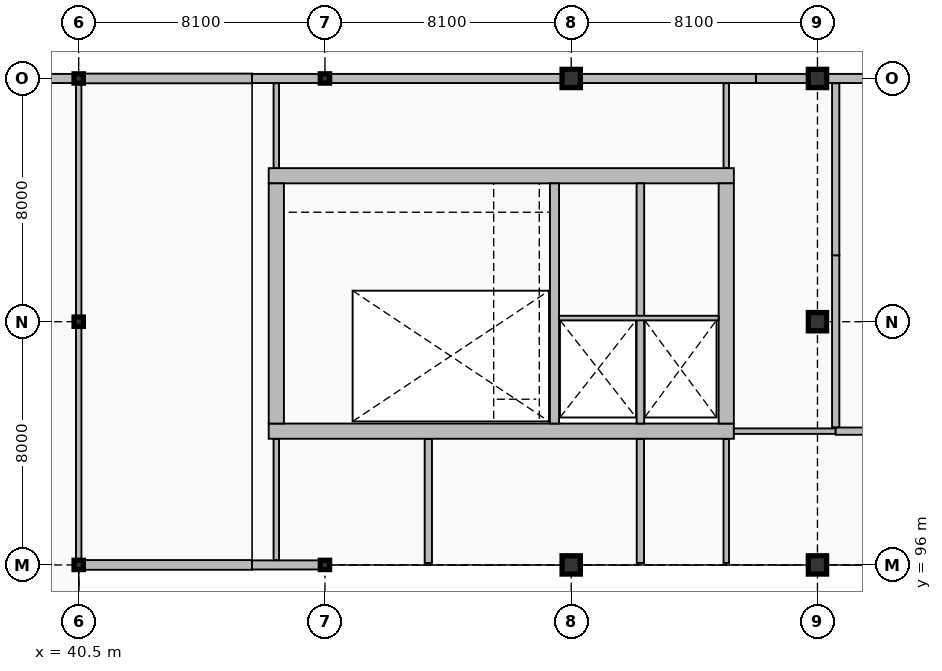
"""IFC4 building model, lengths in metres.
Left out: names, types, materials, properties, quantities, classifications, styles, units other than length and angle.
Written with IfcOpenShell. Run it as: python <this file> out.ifc"""

import sys

from ifc_helpers import new_model, si_unit, direction, frame, frame_2d, origin, origin_2d, place, context, subcontext, project, spatial, rectangle, hollow_rectangle, extrude, element, fill, save


model = new_model("IFC4")
c1 = context("Model", 3, precision=1e-05, world=origin(), true_north=direction((0.0, 1.0)))
c2 = subcontext(c1, "Body", "Model", "MODEL_VIEW")
j1 = project(units=[si_unit("LENGTHUNIT", "METRE"), si_unit("PLANEANGLEUNIT", "RADIAN")], contexts=[c1])
p1 = place(None, origin())
s1 = spatial("IfcSite", under=j1, at=p1, CompositionType="ELEMENT")
p2 = place(p1, origin())
s2 = spatial("IfcBuilding", under=s1, at=p2, CompositionType="ELEMENT")
p3 = place(p2, frame((0.0, 0.0, 19.8)))
s3 = spatial("IfcBuildingStorey", under=s2, at=p3, CompositionType="ELEMENT", Elevation=19.8)
p4 = place(p3, frame((46.75, 100.4, 0.0), z_axis=(0.0, 0.0, 1.0), x_axis=(1.0, 0.0, 0.0)))
e1 = element("IfcWall", 1, at=p4, inside=s3, PredefinedType="SHEAR", context=c2, shape_type="SweptSolid", body=[
    extrude(rectangle(XDim=15.3, YDim=0.5, at=frame_2d((7.65, 0.0))), origin(), (0.0, 0.0, 1.0), 5.1),
])
p5 = place(p4, frame((1.0, 0.0, 0.0)))
e2 = element("IfcOpeningElement", 2, at=p5, cuts=e1, PredefinedType="OPENING", context=c2, shape_type="SweptSolid", body=[
    extrude(rectangle(XDim=1.15, YDim=2.25, at=frame_2d((0.575, 1.125))), frame((0.0, 0.26, 0.0), z_axis=(0.0, -1.0, 0.0), x_axis=(1.0, 0.0, 0.0)), (0.0, 0.0, 1.0), 0.52),
])
p6 = place(p4, frame((10.282, 0.0, 0.0)))
e3 = element("IfcOpeningElement", 3, at=p6, cuts=e1, PredefinedType="OPENING", context=c2, shape_type="SweptSolid", body=[
    extrude(rectangle(XDim=1.1, YDim=2.2, at=frame_2d((0.55, 1.1))), frame((0.0, 0.26, 0.0), z_axis=(0.0, -1.0, 0.0), x_axis=(1.0, 0.0, 0.0)), (0.0, 0.0, 1.0), 0.52),
])
p7 = place(p4, frame((12.998, 0.0, 0.0)))
e4 = element("IfcOpeningElement", 4, at=p7, cuts=e1, PredefinedType="OPENING", context=c2, shape_type="SweptSolid", body=[
    extrude(rectangle(XDim=1.1, YDim=2.2, at=frame_2d((0.55, 1.1))), frame((0.0, 0.26, 0.0), z_axis=(0.0, -1.0, 0.0), x_axis=(1.0, 0.0, 0.0)), (0.0, 0.0, 1.0), 0.52),
])
p8 = place(p3, frame((46.75, 108.8, 0.0), z_axis=(0.0, 0.0, 1.0), x_axis=(1.0, 0.0, 0.0)))
e5 = element("IfcWall", 5, at=p8, inside=s3, PredefinedType="SHEAR", context=c2, shape_type="SweptSolid", body=[
    extrude(rectangle(XDim=15.3, YDim=0.5, at=frame_2d((7.65, 0.0))), origin(), (0.0, 0.0, 1.0), 5.1),
])
for number, where, z_axis, x_axis in (
    (6, (47.0, 100.65, 0.0), (0.0, 0.0, 1.0), (0.0, 1.0, 0.0)),
    (7, (61.8, 100.65, 0.0), (0.0, 0.0, 1.0), (0.0, 1.0, 0.0)),
):
    element("IfcWall", number, at=place(p3, frame(where, z_axis=z_axis, x_axis=x_axis)), inside=s3, PredefinedType="SHEAR", context=c2, shape_type="SweptSolid", body=[
        extrude(rectangle(XDim=7.9, YDim=0.5, at=frame_2d((3.95, 0.0))), origin(), (0.0, 0.0, 1.0), 5.1),
    ])
p9 = place(p3, frame((56.15, 100.65, 0.0), z_axis=(0.0, 0.0, 1.0), x_axis=(0.0, 1.0, 0.0)))
e8 = element("IfcWall", 8, at=p9, inside=s3, PredefinedType="SHEAR", context=c2, shape_type="SweptSolid", body=[
    extrude(rectangle(XDim=7.9, YDim=0.3, at=frame_2d((3.95, 0.0))), origin(), (0.0, 0.0, 1.0), 5.1),
])
p10 = place(p3, frame((58.975, 100.65, 0.0), z_axis=(0.0, 0.0, 1.0), x_axis=(0.0, 1.0, 0.0)))
e9 = element("IfcWall", 9, at=p10, inside=s3, PredefinedType="SHEAR", context=c2, shape_type="SweptSolid", body=[
    extrude(rectangle(XDim=7.9, YDim=0.25, at=frame_2d((3.95, 0.0))), origin(), (0.0, 0.0, 1.0), 5.1),
])
for number, where, z_axis, x_axis in (
    (10, (40.5, 96.0, 0.0), (0.0, 0.0, 1.0), (1.0, 0.0, 0.0)),
    (11, (40.5, 104.0, 0.0), (0.0, 0.0, 1.0), (1.0, 0.0, 0.0)),
    (12, (40.5, 112.0, 0.0), (0.0, 0.0, 1.0), (1.0, 0.0, 0.0)),
    (13, (48.6, 96.0, 0.0), (0.0, 0.0, 1.0), (1.0, 0.0, 0.0)),
    (14, (48.6, 112.0, 0.0), (0.0, 0.0, 1.0), (1.0, 0.0, 0.0)),
):
    element("IfcColumn", number, at=place(p3, frame(where, z_axis=z_axis, x_axis=x_axis)), inside=s3, PredefinedType="COLUMN", context=c2, shape_type="SweptSolid", body=[
        extrude(hollow_rectangle(XDim=0.305, YDim=0.305, WallThickness=0.016, InnerFilletRadius=0.016, OuterFilletRadius=0.032, at=origin_2d()), origin(), (0.0, 0.0, 1.0), 5.1),
    ])
for number, where, z_axis, x_axis in (
    (15, (56.7, 96.0, 0.0), (0.0, 0.0, 1.0), (1.0, 0.0, 0.0)),
    (16, (56.7, 112.0, 0.0), (0.0, 0.0, 1.0), (1.0, 0.0, 0.0)),
    (17, (64.8, 96.0, 0.0), (0.0, 0.0, 1.0), (1.0, 0.0, 0.0)),
    (18, (64.8, 104.0, 0.0), (0.0, 0.0, 1.0), (1.0, 0.0, 0.0)),
    (19, (64.8, 112.0, 0.0), (0.0, 0.0, 1.0), (1.0, 0.0, 0.0)),
):
    element("IfcColumn", number, at=place(p3, frame(where, z_axis=z_axis, x_axis=x_axis)), inside=s3, PredefinedType="COLUMN", context=c2, shape_type="SweptSolid", body=[
        extrude(rectangle(XDim=0.6, YDim=0.6, at=origin_2d()), origin(), (0.0, 0.0, 1.0), 5.1),
    ])
p11 = place(p3, frame((40.5, 96.0, 0.0), z_axis=(0.0, 0.0, 1.0), x_axis=(1.0, 0.0, 0.0)))
e20 = element("IfcWall", 20, at=p11, inside=s3, PredefinedType="SOLIDWALL", context=c2, shape_type="SweptSolid", body=[
    extrude(rectangle(XDim=5.7, YDim=0.32, at=frame_2d((2.85, 0.0))), origin(), (0.0, 0.0, 1.0), 4.302),
])
p12 = place(p3, frame((46.2, 96.0, 0.0), z_axis=(0.0, 0.0, 1.0), x_axis=(1.0, 0.0, 0.0)))
e21 = element("IfcWall", 21, at=p12, inside=s3, PredefinedType="SOLIDWALL", context=c2, shape_type="SweptSolid", body=[
    extrude(rectangle(XDim=2.22, YDim=0.3, at=frame_2d((1.11, 0.0))), origin(), (0.0, 0.0, 1.0), 4.302),
])
p13 = place(p3, frame((76.95, 112.0, 0.0), z_axis=(0.0, 0.0, 1.0), x_axis=(-1.0, 0.0, 0.0)))
e22 = element("IfcWall", 22, at=p13, inside=s3, PredefinedType="SOLIDWALL", context=c2, shape_type="SweptSolid", body=[
    extrude(rectangle(XDim=14.175, YDim=0.3, at=frame_2d((7.087, 0.0))), origin(), (0.0, 0.0, 1.0), 4.302),
])
p14 = place(p13, frame((6.3, 0.0, 0.95)))
e23 = element("IfcOpeningElement", 23, at=p14, cuts=e22, PredefinedType="OPENING", context=c2, shape_type="SweptSolid", body=[
    extrude(rectangle(XDim=1.6, YDim=1.4, at=frame_2d((0.8, 0.7))), frame((0.0, 0.16, 0.0), z_axis=(0.0, -1.0, 0.0), x_axis=(1.0, 0.0, 0.0)), (0.0, 0.0, 1.0), 0.32),
])
p15 = place(p3, frame((62.775, 112.0, 0.0), z_axis=(0.0, 0.0, 1.0), x_axis=(-1.0, 0.0, 0.0)))
e24 = element("IfcWall", 24, at=p15, inside=s3, PredefinedType="SOLIDWALL", context=c2, shape_type="SweptSolid", body=[
    extrude(rectangle(XDim=14.175, YDim=0.3, at=frame_2d((7.087, 0.0))), origin(), (0.0, 0.0, 1.0), 4.302),
])
p16 = place(p15, frame((9.0, 0.0, 0.95)))
e25 = element("IfcOpeningElement", 25, at=p16, cuts=e24, PredefinedType="OPENING", context=c2, shape_type="SweptSolid", body=[
    extrude(rectangle(XDim=0.9, YDim=1.8, at=frame_2d((0.45, 0.9))), frame((0.0, 0.16, 0.0), z_axis=(0.0, -1.0, 0.0), x_axis=(1.0, 0.0, 0.0)), (0.0, 0.0, 1.0), 0.32),
])
p17 = place(p3, frame((48.6, 112.0, 0.0), z_axis=(0.0, 0.0, 1.0), x_axis=(-1.0, 0.0, 0.0)))
e26 = element("IfcWall", 26, at=p17, inside=s3, PredefinedType="SOLIDWALL", context=c2, shape_type="SweptSolid", body=[
    extrude(rectangle(XDim=2.4, YDim=0.3, at=frame_2d((1.2, 0.0))), origin(), (0.0, 0.0, 1.0), 4.389),
])
p18 = place(p3, frame((46.2, 112.0, 0.0), z_axis=(0.0, 0.0, 1.0), x_axis=(-1.0, 0.0, 0.0)))
e27 = element("IfcWall", 27, at=p18, inside=s3, PredefinedType="SOLIDWALL", context=c2, shape_type="SweptSolid", body=[
    extrude(rectangle(XDim=5.7, YDim=0.32, at=frame_2d((2.85, 0.0))), origin(), (0.0, 0.0, 1.0), 4.389),
])
p19 = place(p18, frame((2.25, 0.0, 0.85)))
e28 = element("IfcOpeningElement", 28, at=p19, cuts=e27, PredefinedType="OPENING", context=c2, shape_type="SweptSolid", body=[
    extrude(rectangle(XDim=0.9, YDim=2.1, at=frame_2d((0.45, 1.05))), frame((0.0, 0.17, 0.0), z_axis=(0.0, -1.0, 0.0), x_axis=(1.0, 0.0, 0.0)), (0.0, 0.0, 1.0), 0.34),
])
p20 = place(p3, frame((40.5, 112.0, 0.0), z_axis=(0.0, 0.0, 1.0), x_axis=(-1.0, 0.0, 0.0)))
e29 = element("IfcWall", 29, at=p20, inside=s3, PredefinedType="SOLIDWALL", context=c2, shape_type="SweptSolid", body=[
    extrude(rectangle(XDim=12.15, YDim=0.3, at=frame_2d((6.075, 0.0))), origin(), (0.0, 0.0, 1.0), 4.302),
])
p21 = place(p20, frame((5.4, 0.0, 0.85)))
e30 = element("IfcOpeningElement", 30, at=p21, cuts=e29, PredefinedType="OPENING", context=c2, shape_type="SweptSolid", body=[
    extrude(rectangle(XDim=0.9, YDim=2.4, at=frame_2d((0.45, 1.2))), frame((0.0, 0.16, 0.0), z_axis=(0.0, -1.0, 0.0), x_axis=(1.0, 0.0, 0.0)), (0.0, 0.0, 1.0), 0.32),
])
p22 = place(p3, frame((56.3, 104.12, 0.0), z_axis=(0.0, 0.0, 1.0), x_axis=(1.0, 0.0, 0.0)))
e31 = element("IfcWall", 31, at=p22, inside=s3, PredefinedType="PARTITIONING", context=c2, shape_type="SweptSolid", body=[
    extrude(rectangle(XDim=5.25, YDim=0.15, at=frame_2d((2.625, 0.0))), origin(), (0.0, 0.0, 1.0), 4.86),
])
p23 = place(p3, frame((62.05, 100.4, 0.0), z_axis=(0.0, 0.0, 1.0), x_axis=(1.0, 0.0, 0.0)))
e32 = element("IfcWall", 32, at=p23, inside=s3, PredefinedType="PARTITIONING", context=c2, shape_type="SweptSolid", body=[
    extrude(rectangle(XDim=3.35, YDim=0.18, at=frame_2d((1.675, 0.0))), origin(), (0.0, 0.0, 1.0), 4.86),
])
p24 = place(p23, frame((1.075, 0.0, 0.0)))
e33 = element("IfcOpeningElement", 33, at=p24, cuts=e32, PredefinedType="OPENING", context=c2, shape_type="SweptSolid", body=[
    extrude(rectangle(XDim=1.2, YDim=2.2, at=frame_2d((0.6, 1.1))), frame((0.0, 0.1, 0.0), z_axis=(0.0, -1.0, 0.0), x_axis=(1.0, 0.0, 0.0)), (0.0, 0.0, 1.0), 0.2),
])
p25 = place(p3, frame((65.4, 100.4, 0.0), z_axis=(0.0, 0.0, 1.0), x_axis=(1.0, 0.0, 0.0)))
e34 = element("IfcWall", 34, at=p25, inside=s3, PredefinedType="PARTITIONING", context=c2, shape_type="SweptSolid", body=[
    extrude(rectangle(XDim=19.6, YDim=0.24, at=frame_2d((9.8, 0.0))), origin(), (0.0, 0.0, 1.0), 4.86),
])
p26 = place(p25, frame((9.2, 0.0, 0.0)))
e35 = element("IfcOpeningElement", 35, at=p26, cuts=e34, PredefinedType="OPENING", context=c2, shape_type="SweptSolid", body=[
    extrude(rectangle(XDim=1.2, YDim=2.3, at=frame_2d((0.6, 1.15))), frame((0.0, 0.13, 0.0), z_axis=(0.0, -1.0, 0.0), x_axis=(1.0, 0.0, 0.0)), (0.0, 0.0, 1.0), 0.26),
])
p27 = place(p3, frame((40.5, 96.168, 0.0), z_axis=(0.0, 0.0, 1.0), x_axis=(0.0, 1.0, 0.0)))
e36 = element("IfcWall", 36, at=p27, inside=s3, PredefinedType="PARTITIONING", context=c2, shape_type="SweptSolid", body=[
    extrude(rectangle(XDim=7.672, YDim=0.18, at=frame_2d((3.836, 0.0))), origin(), (0.0, 0.0, 1.0), 4.389),
])
p28 = place(p27, frame((3.236, 0.0, 0.0)))
e37 = element("IfcOpeningElement", 37, at=p28, cuts=e36, PredefinedType="OPENING", context=c2, shape_type="SweptSolid", body=[
    extrude(rectangle(XDim=1.2, YDim=2.2, at=frame_2d((0.6, 1.1))), frame((0.0, 0.1, 0.0), z_axis=(0.0, -1.0, 0.0), x_axis=(1.0, 0.0, 0.0)), (0.0, 0.0, 1.0), 0.2),
])
p29 = place(p3, frame((40.5, 104.16, 0.0), z_axis=(0.0, 0.0, 1.0), x_axis=(0.0, 1.0, 0.0)))
e38 = element("IfcWall", 38, at=p29, inside=s3, PredefinedType="PARTITIONING", context=c2, shape_type="SweptSolid", body=[
    extrude(rectangle(XDim=7.672, YDim=0.18, at=frame_2d((3.836, 0.0))), origin(), (0.0, 0.0, 1.0), 4.389),
])
p30 = place(p3, frame((47.0, 96.158, 0.0), z_axis=(0.0, 0.0, 1.0), x_axis=(0.0, 1.0, 0.0)))
e39 = element("IfcWall", 39, at=p30, inside=s3, PredefinedType="PARTITIONING", context=c2, shape_type="SweptSolid", body=[
    extrude(rectangle(XDim=3.984, YDim=0.18, at=frame_2d((1.992, 0.0))), origin(), (0.0, 0.0, 1.0), 4.86),
])
p31 = place(p30, frame((1.442, 0.0, 0.0)))
e40 = element("IfcOpeningElement", 40, at=p31, cuts=e39, PredefinedType="OPENING", context=c2, shape_type="SweptSolid", body=[
    extrude(rectangle(XDim=1.1, YDim=2.2, at=frame_2d((0.55, 1.1))), frame((0.0, 0.1, 0.0), z_axis=(0.0, -1.0, 0.0), x_axis=(1.0, 0.0, 0.0)), (0.0, 0.0, 1.0), 0.2),
])
p32 = place(p3, frame((47.0, 109.058, 0.0), z_axis=(0.0, 0.0, 1.0), x_axis=(0.0, 1.0, 0.0)))
e41 = element("IfcWall", 41, at=p32, inside=s3, PredefinedType="PARTITIONING", context=c2, shape_type="SweptSolid", body=[
    extrude(rectangle(XDim=2.784, YDim=0.18, at=frame_2d((1.392, 0.0))), origin(), (0.0, 0.0, 1.0), 4.86),
])
p33 = place(p32, frame((0.842, 0.0, 0.0)))
e42 = element("IfcOpeningElement", 42, at=p33, cuts=e41, PredefinedType="OPENING", context=c2, shape_type="SweptSolid", body=[
    extrude(rectangle(XDim=1.1, YDim=2.2, at=frame_2d((0.55, 1.1))), frame((0.0, 0.1, 0.0), z_axis=(0.0, -1.0, 0.0), x_axis=(1.0, 0.0, 0.0)), (0.0, 0.0, 1.0), 0.2),
])
p34 = place(p3, frame((52.0, 96.065, 0.0), z_axis=(0.0, 0.0, 1.0), x_axis=(0.0, 1.0, 0.0)))
e43 = element("IfcWall", 43, at=p34, inside=s3, PredefinedType="PARTITIONING", context=c2, shape_type="SweptSolid", body=[
    extrude(rectangle(XDim=4.077, YDim=0.24, at=frame_2d((2.039, 0.0))), origin(), (0.0, 0.0, 1.0), 4.86),
])
p35 = place(p34, frame((1.438, 0.0, 0.0)))
e44 = element("IfcOpeningElement", 44, at=p35, cuts=e43, PredefinedType="OPENING", context=c2, shape_type="SweptSolid", body=[
    extrude(rectangle(XDim=1.2, YDim=2.3, at=frame_2d((0.6, 1.15))), frame((0.0, 0.13, 0.0), z_axis=(0.0, -1.0, 0.0), x_axis=(1.0, 0.0, 0.0)), (0.0, 0.0, 1.0), 0.26),
])
p36 = place(p3, frame((58.975, 96.065, 0.0), z_axis=(0.0, 0.0, 1.0), x_axis=(0.0, 1.0, 0.0)))
e45 = element("IfcWall", 45, at=p36, inside=s3, PredefinedType="PARTITIONING", context=c2, shape_type="SweptSolid", body=[
    extrude(rectangle(XDim=4.077, YDim=0.24, at=frame_2d((2.039, 0.0))), origin(), (0.0, 0.0, 1.0), 4.86),
])
p37 = place(p3, frame((61.8, 96.065, 0.0), z_axis=(0.0, 0.0, 1.0), x_axis=(0.0, 1.0, 0.0)))
e46 = element("IfcWall", 46, at=p37, inside=s3, PredefinedType="PARTITIONING", context=c2, shape_type="SweptSolid", body=[
    extrude(rectangle(XDim=4.077, YDim=0.18, at=frame_2d((2.039, 0.0))), origin(), (0.0, 0.0, 1.0), 4.86),
])
p38 = place(p37, frame((1.489, 0.0, 0.0)))
e47 = element("IfcOpeningElement", 47, at=p38, cuts=e46, PredefinedType="OPENING", context=c2, shape_type="SweptSolid", body=[
    extrude(rectangle(XDim=1.1, YDim=2.2, at=frame_2d((0.55, 1.1))), frame((0.0, 0.1, 0.0), z_axis=(0.0, -1.0, 0.0), x_axis=(1.0, 0.0, 0.0)), (0.0, 0.0, 1.0), 0.2),
])
p39 = place(p3, frame((61.8, 109.058, 0.0), z_axis=(0.0, 0.0, 1.0), x_axis=(0.0, 1.0, 0.0)))
e48 = element("IfcWall", 48, at=p39, inside=s3, PredefinedType="PARTITIONING", context=c2, shape_type="SweptSolid", body=[
    extrude(rectangle(XDim=2.784, YDim=0.18, at=frame_2d((1.392, 0.0))), origin(), (0.0, 0.0, 1.0), 4.86),
])
p40 = place(p39, frame((0.842, 0.0, 0.0)))
e49 = element("IfcOpeningElement", 49, at=p40, cuts=e48, PredefinedType="OPENING", context=c2, shape_type="SweptSolid", body=[
    extrude(rectangle(XDim=1.1, YDim=2.2, at=frame_2d((0.55, 1.1))), frame((0.0, 0.1, 0.0), z_axis=(0.0, -1.0, 0.0), x_axis=(1.0, 0.0, 0.0)), (0.0, 0.0, 1.0), 0.2),
])
for number, where, z_axis, x_axis in (
    (50, (65.4, 100.528, 0.0), (0.0, 0.0, 1.0), (0.0, 1.0, 0.0)),
    (51, (65.4, 106.185, 0.0), (0.0, 0.0, 1.0), (0.0, 1.0, 0.0)),
):
    element("IfcWall", number, at=place(p3, frame(where, z_axis=z_axis, x_axis=x_axis)), inside=s3, PredefinedType="PARTITIONING", context=c2, shape_type="SweptSolid", body=[
        extrude(rectangle(XDim=5.657, YDim=0.24, at=frame_2d((2.829, 0.0))), origin(), (0.0, 0.0, 1.0), 4.86),
    ])
p41 = place(p16, origin())
e52 = element("IfcWindow", 52, at=p41, inside=s3, PartitioningType="SINGLE_PANEL", PredefinedType="WINDOW", context=c2, shape_type="SweptSolid", body=[
    extrude(rectangle(XDim=0.9, YDim=1.8, at=frame_2d((0.45, 0.9))), frame((0.0, 0.03, 0.0), z_axis=(0.0, -1.0, 0.0), x_axis=(1.0, 0.0, 0.0)), (0.0, 0.0, 1.0), 0.06),
])
fill(e25, e52)
p42 = place(p19, origin())
e53 = element("IfcWindow", 53, at=p42, inside=s3, PartitioningType="SINGLE_PANEL", PredefinedType="WINDOW", context=c2, shape_type="SweptSolid", body=[
    extrude(rectangle(XDim=0.9, YDim=2.1, at=frame_2d((0.45, 1.05))), frame((0.0, 0.03, 0.0), z_axis=(0.0, -1.0, 0.0), x_axis=(1.0, 0.0, 0.0)), (0.0, 0.0, 1.0), 0.06),
])
fill(e28, e53)
p43 = place(p5, origin())
e54 = element("IfcDoor", 54, at=p43, inside=s3, OperationType="SINGLE_SWING_RIGHT", PredefinedType="DOOR", context=c2, shape_type="SweptSolid", body=[
    extrude(rectangle(XDim=1.15, YDim=2.25, at=frame_2d((0.575, 1.125))), frame((0.0, 0.025, 0.0), z_axis=(0.0, -1.0, 0.0), x_axis=(1.0, 0.0, 0.0)), (0.0, 0.0, 1.0), 0.05),
])
fill(e2, e54)
p44 = place(p6, frame((1.1, 0.0, 0.0), z_axis=(0.0, 0.0, 1.0), x_axis=(-1.0, 0.0, 0.0)))
e55 = element("IfcDoor", 55, at=p44, inside=s3, OperationType="DOUBLE_DOOR_SLIDING", PredefinedType="DOOR", context=c2, shape_type="SweptSolid", body=[
    extrude(rectangle(XDim=1.1, YDim=2.2, at=frame_2d((0.55, 1.1))), frame((0.0, 0.025, 0.0), z_axis=(0.0, -1.0, 0.0), x_axis=(1.0, 0.0, 0.0)), (0.0, 0.0, 1.0), 0.05),
])
fill(e3, e55)
p45 = place(p7, frame((1.1, 0.0, 0.0), z_axis=(0.0, 0.0, 1.0), x_axis=(-1.0, 0.0, 0.0)))
e56 = element("IfcDoor", 56, at=p45, inside=s3, OperationType="DOUBLE_DOOR_SLIDING", PredefinedType="DOOR", context=c2, shape_type="SweptSolid", body=[
    extrude(rectangle(XDim=1.1, YDim=2.2, at=frame_2d((0.55, 1.1))), frame((0.0, 0.025, 0.0), z_axis=(0.0, -1.0, 0.0), x_axis=(1.0, 0.0, 0.0)), (0.0, 0.0, 1.0), 0.05),
])
fill(e4, e56)
p46 = place(p24, frame((1.2, 0.0, 0.0), z_axis=(0.0, 0.0, 1.0), x_axis=(-1.0, 0.0, 0.0)))
e57 = element("IfcDoor", 57, at=p46, inside=s3, OperationType="SINGLE_SWING_LEFT", PredefinedType="DOOR", context=c2, shape_type="SweptSolid", body=[
    extrude(rectangle(XDim=1.2, YDim=2.2, at=frame_2d((0.6, 1.1))), frame((0.0, 0.025, 0.0), z_axis=(0.0, -1.0, 0.0), x_axis=(1.0, 0.0, 0.0)), (0.0, 0.0, 1.0), 0.05),
])
fill(e33, e57)
p47 = place(p28, frame((1.2, 0.0, 0.0), z_axis=(0.0, 0.0, 1.0), x_axis=(-1.0, 0.0, 0.0)))
e58 = element("IfcDoor", 58, at=p47, inside=s3, OperationType="SINGLE_SWING_RIGHT", PredefinedType="DOOR", context=c2, shape_type="SweptSolid", body=[
    extrude(rectangle(XDim=1.2, YDim=2.2, at=frame_2d((0.6, 1.1))), frame((0.0, 0.025, 0.0), z_axis=(0.0, -1.0, 0.0), x_axis=(1.0, 0.0, 0.0)), (0.0, 0.0, 1.0), 0.05),
])
fill(e37, e58)
p48 = place(p31, origin())
e59 = element("IfcDoor", 59, at=p48, inside=s3, OperationType="SINGLE_SWING_LEFT", PredefinedType="DOOR", context=c2, shape_type="SweptSolid", body=[
    extrude(rectangle(XDim=1.1, YDim=2.2, at=frame_2d((0.55, 1.1))), frame((0.0, 0.025, 0.0), z_axis=(0.0, -1.0, 0.0), x_axis=(1.0, 0.0, 0.0)), (0.0, 0.0, 1.0), 0.05),
])
fill(e40, e59)
p49 = place(p33, frame((1.1, 0.0, 0.0), z_axis=(0.0, 0.0, 1.0), x_axis=(-1.0, 0.0, 0.0)))
e60 = element("IfcDoor", 60, at=p49, inside=s3, OperationType="SINGLE_SWING_RIGHT", PredefinedType="DOOR", context=c2, shape_type="SweptSolid", body=[
    extrude(rectangle(XDim=1.1, YDim=2.2, at=frame_2d((0.55, 1.1))), frame((0.0, 0.025, 0.0), z_axis=(0.0, -1.0, 0.0), x_axis=(1.0, 0.0, 0.0)), (0.0, 0.0, 1.0), 0.05),
])
fill(e42, e60)
p50 = place(p35, origin())
e61 = element("IfcDoor", 61, at=p50, inside=s3, OperationType="SINGLE_SWING_LEFT", PredefinedType="DOOR", context=c2, shape_type="SweptSolid", body=[
    extrude(rectangle(XDim=1.2, YDim=2.3, at=frame_2d((0.6, 1.15))), frame((0.0, 0.025, 0.0), z_axis=(0.0, -1.0, 0.0), x_axis=(1.0, 0.0, 0.0)), (0.0, 0.0, 1.0), 0.05),
])
fill(e44, e61)
p51 = place(p38, frame((1.1, 0.0, 0.0), z_axis=(0.0, 0.0, 1.0), x_axis=(-1.0, 0.0, 0.0)))
e62 = element("IfcDoor", 62, at=p51, inside=s3, OperationType="SINGLE_SWING_RIGHT", PredefinedType="DOOR", context=c2, shape_type="SweptSolid", body=[
    extrude(rectangle(XDim=1.1, YDim=2.2, at=frame_2d((0.55, 1.1))), frame((0.0, 0.025, 0.0), z_axis=(0.0, -1.0, 0.0), x_axis=(1.0, 0.0, 0.0)), (0.0, 0.0, 1.0), 0.05),
])
fill(e47, e62)
p52 = place(p40, origin())
e63 = element("IfcDoor", 63, at=p52, inside=s3, OperationType="SINGLE_SWING_LEFT", PredefinedType="DOOR", context=c2, shape_type="SweptSolid", body=[
    extrude(rectangle(XDim=1.1, YDim=2.2, at=frame_2d((0.55, 1.1))), frame((0.0, 0.025, 0.0), z_axis=(0.0, -1.0, 0.0), x_axis=(1.0, 0.0, 0.0)), (0.0, 0.0, 1.0), 0.05),
])
fill(e49, e63)
save(model, sys.argv[1])
